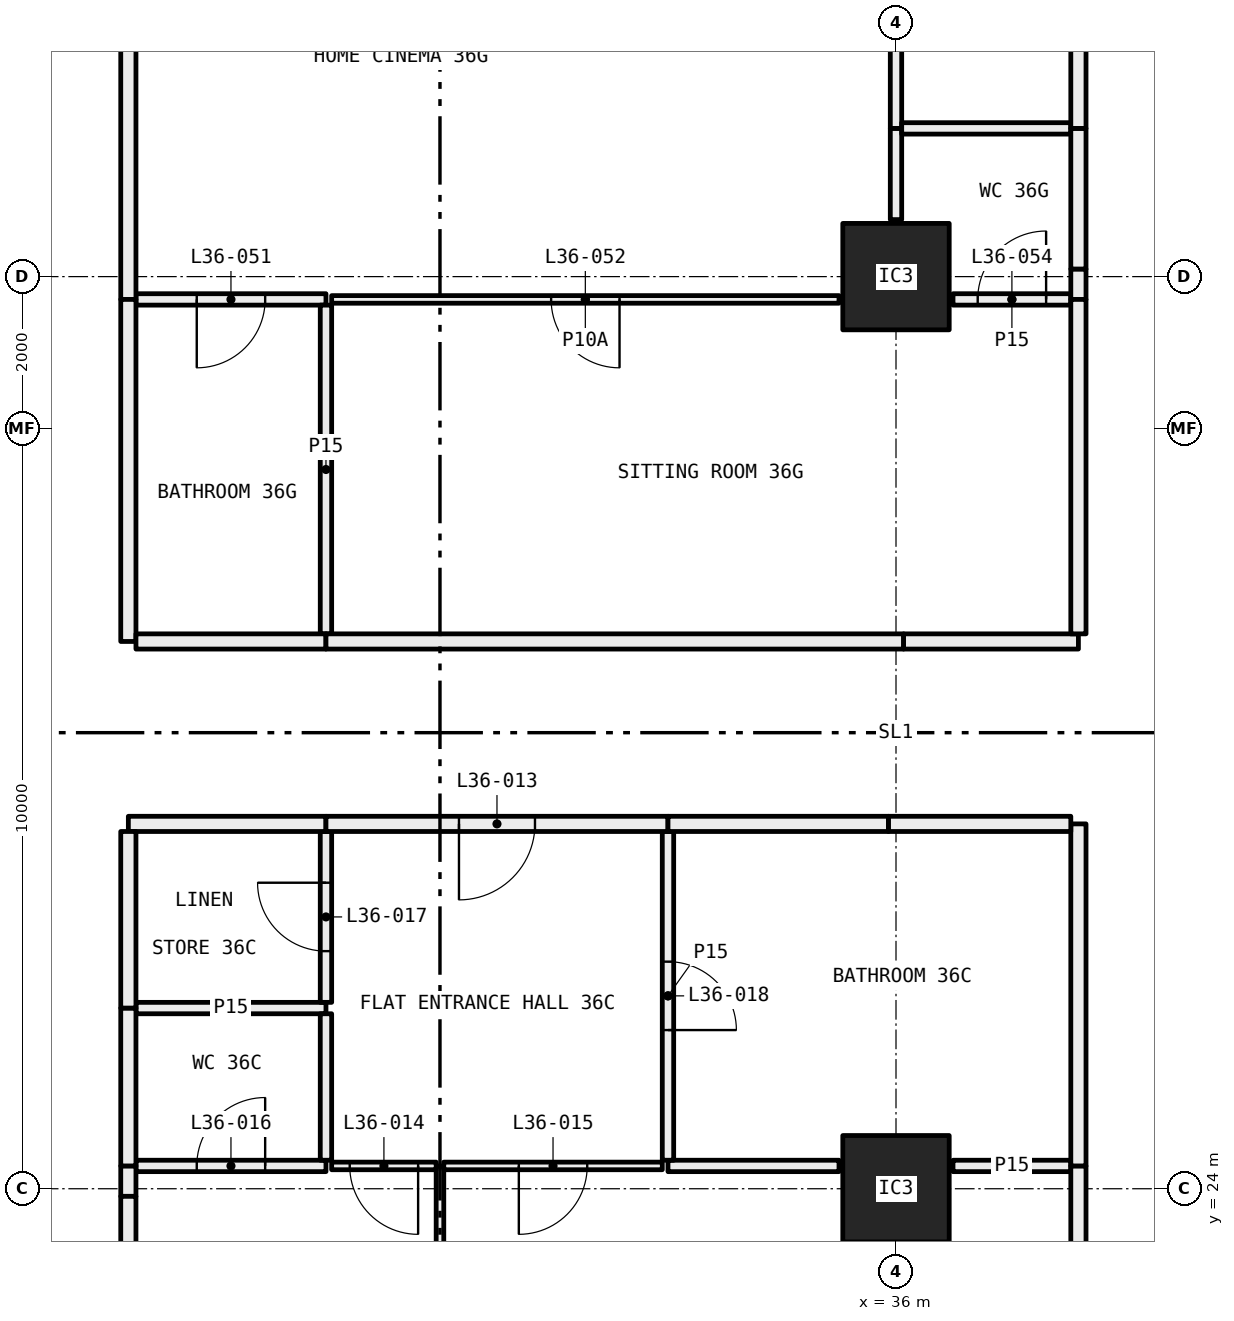
"""IFC4 building model, lengths in metres.
Left out: names, types, materials, properties, quantities, classifications, styles, units other than length and angle.
Written with IfcOpenShell. Run it as: python <this file> out.ifc"""

import sys

from ifc_helpers import new_model, si_unit, direction, frame, frame_2d, origin, origin_2d, place, context, subcontext, project, spatial, rectangle, hollow_rectangle, extrude, element, fill, save


model = new_model("IFC4")
c1 = context("Model", 3, precision=1e-05, world=origin(), true_north=direction((0.0, 1.0)))
c2 = subcontext(c1, "Body", "Model", "MODEL_VIEW")
j1 = project(units=[si_unit("LENGTHUNIT", "METRE"), si_unit("PLANEANGLEUNIT", "RADIAN")], contexts=[c1])
p1 = place(None, origin())
s1 = spatial("IfcSite", under=j1, at=p1, CompositionType="ELEMENT")
p2 = place(p1, origin())
s2 = spatial("IfcBuilding", under=s1, at=p2, CompositionType="ELEMENT")
p3 = place(p2, frame((0.0, 0.0, 138.0)))
s3 = spatial("IfcBuildingStorey", under=s2, at=p3, CompositionType="ELEMENT", Elevation=138.0)
for number, where, z_axis, x_axis in (
    (1, (36.0, 24.0, 0.0), (0.0, 0.0, 1.0), (1.0, 0.0, 0.0)),
    (2, (36.0, 36.0, 0.0), (0.0, 0.0, 1.0), (1.0, 0.0, 0.0)),
):
    element("IfcColumn", number, at=place(p3, frame(where, z_axis=z_axis, x_axis=x_axis)), inside=s3, PredefinedType="COLUMN", context=c2, shape_type="SweptSolid", body=[
        extrude(hollow_rectangle(XDim=1.4, YDim=1.4, WallThickness=0.06, at=origin_2d()), origin(), (0.0, 0.0, 1.0), 3.05),
    ])
p4 = place(p3, frame((30.0, 18.1, 0.0), z_axis=(0.0, 0.0, 1.0), x_axis=(0.0, 1.0, 0.0)))
e3 = element("IfcWall", 3, at=p4, inside=s3, PredefinedType="PARTITIONING", context=c2, shape_type="SweptSolid", body=[
    extrude(rectangle(XDim=6.2, YDim=0.1, at=frame_2d((3.1, 0.0))), origin(), (0.0, 0.0, 1.0), 2.45),
])
p5 = place(p3, frame((28.5, 24.3, 0.0), z_axis=(0.0, 0.0, 1.0), x_axis=(-1.0, 0.0, 0.0)))
e4 = element("IfcWall", 4, at=p5, inside=s3, PredefinedType="PARTITIONING", context=c2, shape_type="SweptSolid", body=[
    extrude(rectangle(XDim=2.5, YDim=0.15, at=frame_2d((1.25, 0.0))), origin(), (0.0, 0.0, 1.0), 3.05),
])
p6 = place(p5, frame((0.8, 0.0, 0.0)))
e5 = element("IfcOpeningElement", 5, at=p6, cuts=e4, PredefinedType="OPENING", context=c2, shape_type="SweptSolid", body=[
    extrude(rectangle(XDim=0.9, YDim=2.1, at=frame_2d((0.45, 1.05))), frame((0.0, 0.085, 0.0), z_axis=(0.0, -1.0, 0.0), x_axis=(1.0, 0.0, 0.0)), (0.0, 0.0, 1.0), 0.17),
])
p7 = place(p3, frame((29.95, 24.3, 0.0), z_axis=(0.0, 0.0, 1.0), x_axis=(-1.0, 0.0, 0.0)))
e6 = element("IfcWall", 6, at=p7, inside=s3, PredefinedType="PARTITIONING", context=c2, shape_type="SweptSolid", body=[
    extrude(rectangle(XDim=1.375, YDim=0.1, at=frame_2d((0.688, 0.0))), origin(), (0.0, 0.0, 1.0), 3.05),
])
p8 = place(p7, frame((0.238, 0.0, 0.0)))
e7 = element("IfcOpeningElement", 7, at=p8, cuts=e6, PredefinedType="OPENING", context=c2, shape_type="SweptSolid", body=[
    extrude(rectangle(XDim=0.9, YDim=2.1, at=frame_2d((0.45, 1.05))), frame((0.0, 0.06, 0.0), z_axis=(0.0, -1.0, 0.0), x_axis=(1.0, 0.0, 0.0)), (0.0, 0.0, 1.0), 0.12),
])
p9 = place(p3, frame((25.9, 24.3, 0.0), z_axis=(0.0, 0.0, 1.0), x_axis=(0.0, -1.0, 0.0)))
e8 = element("IfcWall", 8, at=p9, inside=s3, PredefinedType="PARTITIONING", context=c2, shape_type="SweptSolid", body=[
    extrude(rectangle(XDim=0.4, YDim=0.2, at=frame_2d((0.2, 0.0))), origin(), (0.0, 0.0, 1.0), 2.45),
])
p10 = place(p3, frame((25.9, 23.9, 0.0), z_axis=(0.0, 0.0, 1.0), x_axis=(0.0, -1.0, 0.0)))
e9 = element("IfcWall", 9, at=p10, inside=s3, PredefinedType="PARTITIONING", context=c2, shape_type="SweptSolid", body=[
    extrude(rectangle(XDim=5.8, YDim=0.2, at=frame_2d((2.9, 0.0))), origin(), (0.0, 0.0, 1.0), 3.05),
])
p11 = place(p3, frame((32.925, 24.3, 0.0), z_axis=(0.0, 0.0, 1.0), x_axis=(-1.0, 0.0, 0.0)))
e10 = element("IfcWall", 10, at=p11, inside=s3, PredefinedType="PARTITIONING", context=c2, shape_type="SweptSolid", body=[
    extrude(rectangle(XDim=2.875, YDim=0.1, at=frame_2d((1.438, 0.0))), origin(), (0.0, 0.0, 1.0), 3.05),
])
p12 = place(p11, frame((0.988, 0.0, 0.0)))
e11 = element("IfcOpeningElement", 11, at=p12, cuts=e10, PredefinedType="OPENING", context=c2, shape_type="SweptSolid", body=[
    extrude(rectangle(XDim=0.9, YDim=2.1, at=frame_2d((0.45, 1.05))), frame((0.0, 0.06, 0.0), z_axis=(0.0, -1.0, 0.0), x_axis=(1.0, 0.0, 0.0)), (0.0, 0.0, 1.0), 0.12),
])
p13 = place(p3, frame((35.25, 24.3, 0.0), z_axis=(0.0, 0.0, 1.0), x_axis=(-1.0, 0.0, 0.0)))
e12 = element("IfcWall", 12, at=p13, inside=s3, PredefinedType="PARTITIONING", context=c2, shape_type="SweptSolid", body=[
    extrude(rectangle(XDim=2.25, YDim=0.15, at=frame_2d((1.125, 0.0))), origin(), (0.0, 0.0, 1.0), 3.05),
])
p14 = place(p3, frame((38.3, 24.3, 0.0), z_axis=(0.0, 0.0, 1.0), x_axis=(-1.0, 0.0, 0.0)))
e13 = element("IfcWall", 13, at=p14, inside=s3, PredefinedType="PARTITIONING", context=c2, shape_type="SweptSolid", body=[
    extrude(rectangle(XDim=1.55, YDim=0.15, at=frame_2d((0.775, 0.0))), origin(), (0.0, 0.0, 1.0), 3.05),
])
p15 = place(p3, frame((38.4, 18.1, 0.0), z_axis=(0.0, 0.0, 1.0), x_axis=(0.0, 1.0, 0.0)))
e14 = element("IfcWall", 14, at=p15, inside=s3, PredefinedType="PARTITIONING", context=c2, shape_type="SweptSolid", body=[
    extrude(rectangle(XDim=6.2, YDim=0.2, at=frame_2d((3.1, 0.0))), origin(), (0.0, 0.0, 1.0), 2.45),
])
p16 = place(p3, frame((28.5, 26.377, 0.0), z_axis=(0.0, 0.0, 1.0), x_axis=(-1.0, 0.0, 0.0)))
e15 = element("IfcWall", 15, at=p16, inside=s3, PredefinedType="PARTITIONING", context=c2, shape_type="SweptSolid", body=[
    extrude(rectangle(XDim=2.5, YDim=0.15, at=frame_2d((1.25, 0.0))), origin(), (0.0, 0.0, 1.0), 3.05),
])
p17 = place(p3, frame((28.5, 24.375, 0.0), z_axis=(0.0, 0.0, 1.0), x_axis=(0.0, 1.0, 0.0)))
e16 = element("IfcWall", 16, at=p17, inside=s3, PredefinedType="PARTITIONING", context=c2, shape_type="SweptSolid", body=[
    extrude(rectangle(XDim=1.927, YDim=0.15, at=frame_2d((0.963, 0.0))), origin(), (0.0, 0.0, 1.0), 3.05),
])
p18 = place(p3, frame((25.9, 26.377, 0.0), z_axis=(0.0, 0.0, 1.0), x_axis=(0.0, -1.0, 0.0)))
e17 = element("IfcWall", 17, at=p18, inside=s3, PredefinedType="PARTITIONING", context=c2, shape_type="SweptSolid", body=[
    extrude(rectangle(XDim=2.077, YDim=0.2, at=frame_2d((1.039, 0.0))), origin(), (0.0, 0.0, 1.0), 3.05),
])
p19 = place(p3, frame((28.5, 26.452, 0.0), z_axis=(0.0, 0.0, 1.0), x_axis=(0.0, 1.0, 0.0)))
e18 = element("IfcWall", 18, at=p19, inside=s3, PredefinedType="PARTITIONING", context=c2, shape_type="SweptSolid", body=[
    extrude(rectangle(XDim=2.248, YDim=0.15, at=frame_2d((1.124, 0.0))), origin(), (0.0, 0.0, 1.0), 3.05),
])
p20 = place(p19, frame((0.674, 0.0, 0.0)))
e19 = element("IfcOpeningElement", 19, at=p20, cuts=e18, PredefinedType="OPENING", context=c2, shape_type="SweptSolid", body=[
    extrude(rectangle(XDim=0.9, YDim=2.1, at=frame_2d((0.45, 1.05))), frame((0.0, 0.085, 0.0), z_axis=(0.0, -1.0, 0.0), x_axis=(1.0, 0.0, 0.0)), (0.0, 0.0, 1.0), 0.17),
])
p21 = place(p3, frame((28.5, 28.8, 0.0), z_axis=(0.0, 0.0, 1.0), x_axis=(-1.0, 0.0, 0.0)))
e20 = element("IfcWall", 20, at=p21, inside=s3, PredefinedType="PARTITIONING", context=c2, shape_type="SweptSolid", body=[
    extrude(rectangle(XDim=2.6, YDim=0.2, at=frame_2d((1.3, 0.0))), origin(), (0.0, 0.0, 1.0), 3.05),
])
p22 = place(p3, frame((25.9, 28.7, 0.0), z_axis=(0.0, 0.0, 1.0), x_axis=(0.0, -1.0, 0.0)))
e21 = element("IfcWall", 21, at=p22, inside=s3, PredefinedType="PARTITIONING", context=c2, shape_type="SweptSolid", body=[
    extrude(rectangle(XDim=2.323, YDim=0.2, at=frame_2d((1.162, 0.0))), origin(), (0.0, 0.0, 1.0), 3.05),
])
p23 = place(p3, frame((33.0, 24.375, 0.0), z_axis=(0.0, 0.0, 1.0), x_axis=(0.0, 1.0, 0.0)))
e22 = element("IfcWall", 22, at=p23, inside=s3, PredefinedType="PARTITIONING", context=c2, shape_type="SweptSolid", body=[
    extrude(rectangle(XDim=4.325, YDim=0.15, at=frame_2d((2.163, 0.0))), origin(), (0.0, 0.0, 1.0), 3.05),
])
p24 = place(p23, frame((1.712, 0.0, 0.0)))
e23 = element("IfcOpeningElement", 23, at=p24, cuts=e22, PredefinedType="OPENING", context=c2, shape_type="SweptSolid", body=[
    extrude(rectangle(XDim=0.9, YDim=2.1, at=frame_2d((0.45, 1.05))), frame((0.0, 0.085, 0.0), z_axis=(0.0, -1.0, 0.0), x_axis=(1.0, 0.0, 0.0)), (0.0, 0.0, 1.0), 0.17),
])
p25 = place(p3, frame((33.0, 28.8, 0.0), z_axis=(0.0, 0.0, 1.0), x_axis=(-1.0, 0.0, 0.0)))
e24 = element("IfcWall", 24, at=p25, inside=s3, PredefinedType="PARTITIONING", context=c2, shape_type="SweptSolid", body=[
    extrude(rectangle(XDim=4.5, YDim=0.2, at=frame_2d((2.25, 0.0))), origin(), (0.0, 0.0, 1.0), 3.05),
])
p26 = place(p25, frame((1.75, 0.0, 0.0)))
e25 = element("IfcOpeningElement", 25, at=p26, cuts=e24, PredefinedType="OPENING", context=c2, shape_type="SweptSolid", body=[
    extrude(rectangle(XDim=1.0, YDim=2.1, at=frame_2d((0.5, 1.05))), frame((0.0, 0.11, 0.0), z_axis=(0.0, -1.0, 0.0), x_axis=(1.0, 0.0, 0.0)), (0.0, 0.0, 1.0), 0.22),
])
p27 = place(p3, frame((38.4, 24.3, 0.0), z_axis=(0.0, 0.0, 1.0), x_axis=(0.0, 1.0, 0.0)))
e26 = element("IfcWall", 26, at=p27, inside=s3, PredefinedType="PARTITIONING", context=c2, shape_type="SweptSolid", body=[
    extrude(rectangle(XDim=4.5, YDim=0.2, at=frame_2d((2.25, 0.0))), origin(), (0.0, 0.0, 1.0), 3.05),
])
p28 = place(p3, frame((38.3, 28.8, 0.0), z_axis=(0.0, 0.0, 1.0), x_axis=(-1.0, 0.0, 0.0)))
e27 = element("IfcWall", 27, at=p28, inside=s3, PredefinedType="PARTITIONING", context=c2, shape_type="SweptSolid", body=[
    extrude(rectangle(XDim=2.4, YDim=0.2, at=frame_2d((1.2, 0.0))), origin(), (0.0, 0.0, 1.0), 2.45),
])
p29 = place(p3, frame((35.9, 28.8, 0.0), z_axis=(0.0, 0.0, 1.0), x_axis=(-1.0, 0.0, 0.0)))
e28 = element("IfcWall", 28, at=p29, inside=s3, PredefinedType="PARTITIONING", context=c2, shape_type="SweptSolid", body=[
    extrude(rectangle(XDim=2.9, YDim=0.2, at=frame_2d((1.45, 0.0))), origin(), (0.0, 0.0, 1.0), 3.05),
])
p30 = place(p3, frame((36.0, 36.75, 0.0), z_axis=(0.0, 0.0, 1.0), x_axis=(0.0, 1.0, 0.0)))
e29 = element("IfcWall", 29, at=p30, inside=s3, PredefinedType="PARTITIONING", context=c2, shape_type="SweptSolid", body=[
    extrude(rectangle(XDim=1.2, YDim=0.15, at=frame_2d((0.6, 0.0))), origin(), (0.0, 0.0, 1.0), 2.45),
])
p31 = place(p3, frame((36.0, 37.95, 0.0), z_axis=(0.0, 0.0, 1.0), x_axis=(0.0, 1.0, 0.0)))
e30 = element("IfcWall", 30, at=p31, inside=s3, PredefinedType="PARTITIONING", context=c2, shape_type="SweptSolid", body=[
    extrude(rectangle(XDim=3.975, YDim=0.15, at=frame_2d((1.988, 0.0))), origin(), (0.0, 0.0, 1.0), 2.45),
])
p32 = place(p31, frame((1.538, 0.0, 0.0)))
e31 = element("IfcOpeningElement", 31, at=p32, cuts=e30, PredefinedType="OPENING", context=c2, shape_type="SweptSolid", body=[
    extrude(rectangle(XDim=0.9, YDim=2.1, at=frame_2d((0.45, 1.05))), frame((0.0, 0.085, 0.0), z_axis=(0.0, -1.0, 0.0), x_axis=(1.0, 0.0, 0.0)), (0.0, 0.0, 1.0), 0.17),
])
p33 = place(p3, frame((26.0, 35.7, 0.0), z_axis=(0.0, 0.0, 1.0), x_axis=(1.0, 0.0, 0.0)))
e32 = element("IfcWall", 32, at=p33, inside=s3, PredefinedType="PARTITIONING", context=c2, shape_type="SweptSolid", body=[
    extrude(rectangle(XDim=2.5, YDim=0.15, at=frame_2d((1.25, 0.0))), origin(), (0.0, 0.0, 1.0), 3.05),
])
p34 = place(p33, frame((0.8, 0.0, 0.0)))
e33 = element("IfcOpeningElement", 33, at=p34, cuts=e32, PredefinedType="OPENING", context=c2, shape_type="SweptSolid", body=[
    extrude(rectangle(XDim=0.9, YDim=2.1, at=frame_2d((0.45, 1.05))), frame((0.0, 0.085, 0.0), z_axis=(0.0, -1.0, 0.0), x_axis=(1.0, 0.0, 0.0)), (0.0, 0.0, 1.0), 0.17),
])
p35 = place(p3, frame((28.575, 35.7, 0.0), z_axis=(0.0, 0.0, 1.0), x_axis=(1.0, 0.0, 0.0)))
e34 = element("IfcWall", 34, at=p35, inside=s3, PredefinedType="PARTITIONING", context=c2, shape_type="SweptSolid", body=[
    extrude(rectangle(XDim=6.675, YDim=0.1, at=frame_2d((3.337, 0.0))), origin(), (0.0, 0.0, 1.0), 3.05),
])
p36 = place(p35, frame((2.887, 0.0, 0.0)))
e35 = element("IfcOpeningElement", 35, at=p36, cuts=e34, PredefinedType="OPENING", context=c2, shape_type="SweptSolid", body=[
    extrude(rectangle(XDim=0.9, YDim=2.1, at=frame_2d((0.45, 1.05))), frame((0.0, 0.06, 0.0), z_axis=(0.0, -1.0, 0.0), x_axis=(1.0, 0.0, 0.0)), (0.0, 0.0, 1.0), 0.12),
])
p37 = place(p3, frame((25.9, 41.9, 0.0), z_axis=(0.0, 0.0, 1.0), x_axis=(0.0, -1.0, 0.0)))
e36 = element("IfcWall", 36, at=p37, inside=s3, PredefinedType="PARTITIONING", context=c2, shape_type="SweptSolid", body=[
    extrude(rectangle(XDim=6.2, YDim=0.2, at=frame_2d((3.1, 0.0))), origin(), (0.0, 0.0, 1.0), 2.45),
])
p38 = place(p3, frame((38.3, 37.95, 0.0), z_axis=(0.0, 0.0, 1.0), x_axis=(-1.0, 0.0, 0.0)))
e37 = element("IfcWall", 37, at=p38, inside=s3, PredefinedType="PARTITIONING", context=c2, shape_type="SweptSolid", body=[
    extrude(rectangle(XDim=2.225, YDim=0.15, at=frame_2d((1.113, 0.0))), origin(), (0.0, 0.0, 1.0), 2.45),
])
p39 = place(p3, frame((36.75, 35.7, 0.0), z_axis=(0.0, 0.0, 1.0), x_axis=(1.0, 0.0, 0.0)))
e38 = element("IfcWall", 38, at=p39, inside=s3, PredefinedType="PARTITIONING", context=c2, shape_type="SweptSolid", body=[
    extrude(rectangle(XDim=1.55, YDim=0.15, at=frame_2d((0.775, 0.0))), origin(), (0.0, 0.0, 1.0), 3.05),
])
p40 = place(p39, frame((0.325, 0.0, 0.0)))
e39 = element("IfcOpeningElement", 39, at=p40, cuts=e38, PredefinedType="OPENING", context=c2, shape_type="SweptSolid", body=[
    extrude(rectangle(XDim=0.9, YDim=2.1, at=frame_2d((0.45, 1.05))), frame((0.0, 0.085, 0.0), z_axis=(0.0, -1.0, 0.0), x_axis=(1.0, 0.0, 0.0)), (0.0, 0.0, 1.0), 0.17),
])
p41 = place(p3, frame((38.4, 35.7, 0.0), z_axis=(0.0, 0.0, 1.0), x_axis=(0.0, 1.0, 0.0)))
e40 = element("IfcWall", 40, at=p41, inside=s3, PredefinedType="PARTITIONING", context=c2, shape_type="SweptSolid", body=[
    extrude(rectangle(XDim=0.4, YDim=0.2, at=frame_2d((0.2, 0.0))), origin(), (0.0, 0.0, 1.0), 2.45),
])
p42 = place(p3, frame((38.4, 36.1, 0.0), z_axis=(0.0, 0.0, 1.0), x_axis=(0.0, 1.0, 0.0)))
e41 = element("IfcWall", 41, at=p42, inside=s3, PredefinedType="PARTITIONING", context=c2, shape_type="SweptSolid", body=[
    extrude(rectangle(XDim=1.85, YDim=0.2, at=frame_2d((0.925, 0.0))), origin(), (0.0, 0.0, 1.0), 3.05),
])
p43 = place(p3, frame((38.4, 37.95, 0.0), z_axis=(0.0, 0.0, 1.0), x_axis=(0.0, 1.0, 0.0)))
e42 = element("IfcWall", 42, at=p43, inside=s3, PredefinedType="PARTITIONING", context=c2, shape_type="SweptSolid", body=[
    extrude(rectangle(XDim=3.95, YDim=0.2, at=frame_2d((1.975, 0.0))), origin(), (0.0, 0.0, 1.0), 3.05),
])
p44 = place(p3, frame((28.5, 31.3, 0.0), z_axis=(0.0, 0.0, 1.0), x_axis=(0.0, 1.0, 0.0)))
e43 = element("IfcWall", 43, at=p44, inside=s3, PredefinedType="PARTITIONING", context=c2, shape_type="SweptSolid", body=[
    extrude(rectangle(XDim=4.325, YDim=0.15, at=frame_2d((2.163, 0.0))), origin(), (0.0, 0.0, 1.0), 3.05),
])
p45 = place(p3, frame((25.9, 35.7, 0.0), z_axis=(0.0, 0.0, 1.0), x_axis=(0.0, -1.0, 0.0)))
e44 = element("IfcWall", 44, at=p45, inside=s3, PredefinedType="PARTITIONING", context=c2, shape_type="SweptSolid", body=[
    extrude(rectangle(XDim=4.5, YDim=0.2, at=frame_2d((2.25, 0.0))), origin(), (0.0, 0.0, 1.0), 3.05),
])
p46 = place(p3, frame((26.0, 31.2, 0.0), z_axis=(0.0, 0.0, 1.0), x_axis=(1.0, 0.0, 0.0)))
e45 = element("IfcWall", 45, at=p46, inside=s3, PredefinedType="PARTITIONING", context=c2, shape_type="SweptSolid", body=[
    extrude(rectangle(XDim=2.5, YDim=0.2, at=frame_2d((1.25, 0.0))), origin(), (0.0, 0.0, 1.0), 3.05),
])
p47 = place(p3, frame((28.5, 31.2, 0.0), z_axis=(0.0, 0.0, 1.0), x_axis=(1.0, 0.0, 0.0)))
e46 = element("IfcWall", 46, at=p47, inside=s3, PredefinedType="PARTITIONING", context=c2, shape_type="SweptSolid", body=[
    extrude(rectangle(XDim=7.6, YDim=0.2, at=frame_2d((3.8, 0.0))), origin(), (0.0, 0.0, 1.0), 2.45),
])
p48 = place(p3, frame((36.1, 31.2, 0.0), z_axis=(0.0, 0.0, 1.0), x_axis=(1.0, 0.0, 0.0)))
e47 = element("IfcWall", 47, at=p48, inside=s3, PredefinedType="PARTITIONING", context=c2, shape_type="SweptSolid", body=[
    extrude(rectangle(XDim=2.3, YDim=0.2, at=frame_2d((1.15, 0.0))), origin(), (0.0, 0.0, 1.0), 3.05),
])
p49 = place(p3, frame((38.4, 31.3, 0.0), z_axis=(0.0, 0.0, 1.0), x_axis=(0.0, 1.0, 0.0)))
e48 = element("IfcWall", 48, at=p49, inside=s3, PredefinedType="PARTITIONING", context=c2, shape_type="SweptSolid", body=[
    extrude(rectangle(XDim=4.4, YDim=0.2, at=frame_2d((2.2, 0.0))), origin(), (0.0, 0.0, 1.0), 3.05),
])
p50 = place(p26, origin())
e49 = element("IfcDoor", 49, at=p50, inside=s3, OperationType="SINGLE_SWING_LEFT", PredefinedType="DOOR", context=c2, shape_type="SweptSolid", body=[
    extrude(rectangle(XDim=1.0, YDim=2.1, at=frame_2d((0.5, 1.05))), frame((0.0, 0.025, 0.0), z_axis=(0.0, -1.0, 0.0), x_axis=(1.0, 0.0, 0.0)), (0.0, 0.0, 1.0), 0.05),
])
fill(e25, e49)
p51 = place(p8, origin())
e50 = element("IfcDoor", 50, at=p51, inside=s3, OperationType="SINGLE_SWING_RIGHT", PredefinedType="DOOR", context=c2, shape_type="SweptSolid", body=[
    extrude(rectangle(XDim=0.9, YDim=2.1, at=frame_2d((0.45, 1.05))), frame((0.0, 0.025, 0.0), z_axis=(0.0, -1.0, 0.0), x_axis=(1.0, 0.0, 0.0)), (0.0, 0.0, 1.0), 0.05),
])
fill(e7, e50)
p52 = place(p12, origin())
e51 = element("IfcDoor", 51, at=p52, inside=s3, OperationType="SINGLE_SWING_LEFT", PredefinedType="DOOR", context=c2, shape_type="SweptSolid", body=[
    extrude(rectangle(XDim=0.9, YDim=2.1, at=frame_2d((0.45, 1.05))), frame((0.0, 0.025, 0.0), z_axis=(0.0, -1.0, 0.0), x_axis=(1.0, 0.0, 0.0)), (0.0, 0.0, 1.0), 0.05),
])
fill(e11, e51)
p53 = place(p6, frame((0.9, 0.0, 0.0), x_axis=(-1.0, 0.0, 0.0)))
e52 = element("IfcDoor", 52, at=p53, inside=s3, OperationType="SINGLE_SWING_LEFT", PredefinedType="DOOR", context=c2, shape_type="SweptSolid", body=[
    extrude(rectangle(XDim=0.9, YDim=2.1, at=frame_2d((0.45, 1.05))), frame((0.0, 0.025, 0.0), z_axis=(0.0, -1.0, 0.0), x_axis=(1.0, 0.0, 0.0)), (0.0, 0.0, 1.0), 0.05),
])
fill(e5, e52)
p54 = place(p20, origin())
e53 = element("IfcDoor", 53, at=p54, inside=s3, OperationType="SINGLE_SWING_LEFT", PredefinedType="DOOR", context=c2, shape_type="SweptSolid", body=[
    extrude(rectangle(XDim=0.9, YDim=2.1, at=frame_2d((0.45, 1.05))), frame((0.0, 0.025, 0.0), z_axis=(0.0, -1.0, 0.0), x_axis=(1.0, 0.0, 0.0)), (0.0, 0.0, 1.0), 0.05),
])
fill(e19, e53)
p55 = place(p24, frame((0.9, 0.0, 0.0), x_axis=(-1.0, 0.0, 0.0)))
e54 = element("IfcDoor", 54, at=p55, inside=s3, OperationType="SINGLE_SWING_LEFT", PredefinedType="DOOR", context=c2, shape_type="SweptSolid", body=[
    extrude(rectangle(XDim=0.9, YDim=2.1, at=frame_2d((0.45, 1.05))), frame((0.0, 0.025, 0.0), z_axis=(0.0, -1.0, 0.0), x_axis=(1.0, 0.0, 0.0)), (0.0, 0.0, 1.0), 0.05),
])
fill(e23, e54)
p56 = place(p34, frame((0.9, 0.0, 0.0), x_axis=(-1.0, 0.0, 0.0)))
e55 = element("IfcDoor", 55, at=p56, inside=s3, OperationType="SINGLE_SWING_LEFT", PredefinedType="DOOR", context=c2, shape_type="SweptSolid", body=[
    extrude(rectangle(XDim=0.9, YDim=2.1, at=frame_2d((0.45, 1.05))), frame((0.0, 0.025, 0.0), z_axis=(0.0, -1.0, 0.0), x_axis=(1.0, 0.0, 0.0)), (0.0, 0.0, 1.0), 0.05),
])
fill(e33, e55)
p57 = place(p36, frame((0.9, 0.0, 0.0), x_axis=(-1.0, 0.0, 0.0)))
e56 = element("IfcDoor", 56, at=p57, inside=s3, OperationType="SINGLE_SWING_RIGHT", PredefinedType="DOOR", context=c2, shape_type="SweptSolid", body=[
    extrude(rectangle(XDim=0.9, YDim=2.1, at=frame_2d((0.45, 1.05))), frame((0.0, 0.025, 0.0), z_axis=(0.0, -1.0, 0.0), x_axis=(1.0, 0.0, 0.0)), (0.0, 0.0, 1.0), 0.05),
])
fill(e35, e56)
p58 = place(p40, origin())
e57 = element("IfcDoor", 57, at=p58, inside=s3, OperationType="SINGLE_SWING_LEFT", PredefinedType="DOOR", context=c2, shape_type="SweptSolid", body=[
    extrude(rectangle(XDim=0.9, YDim=2.1, at=frame_2d((0.45, 1.05))), frame((0.0, 0.025, 0.0), z_axis=(0.0, -1.0, 0.0), x_axis=(1.0, 0.0, 0.0)), (0.0, 0.0, 1.0), 0.05),
])
fill(e39, e57)
save(model, sys.argv[1])
